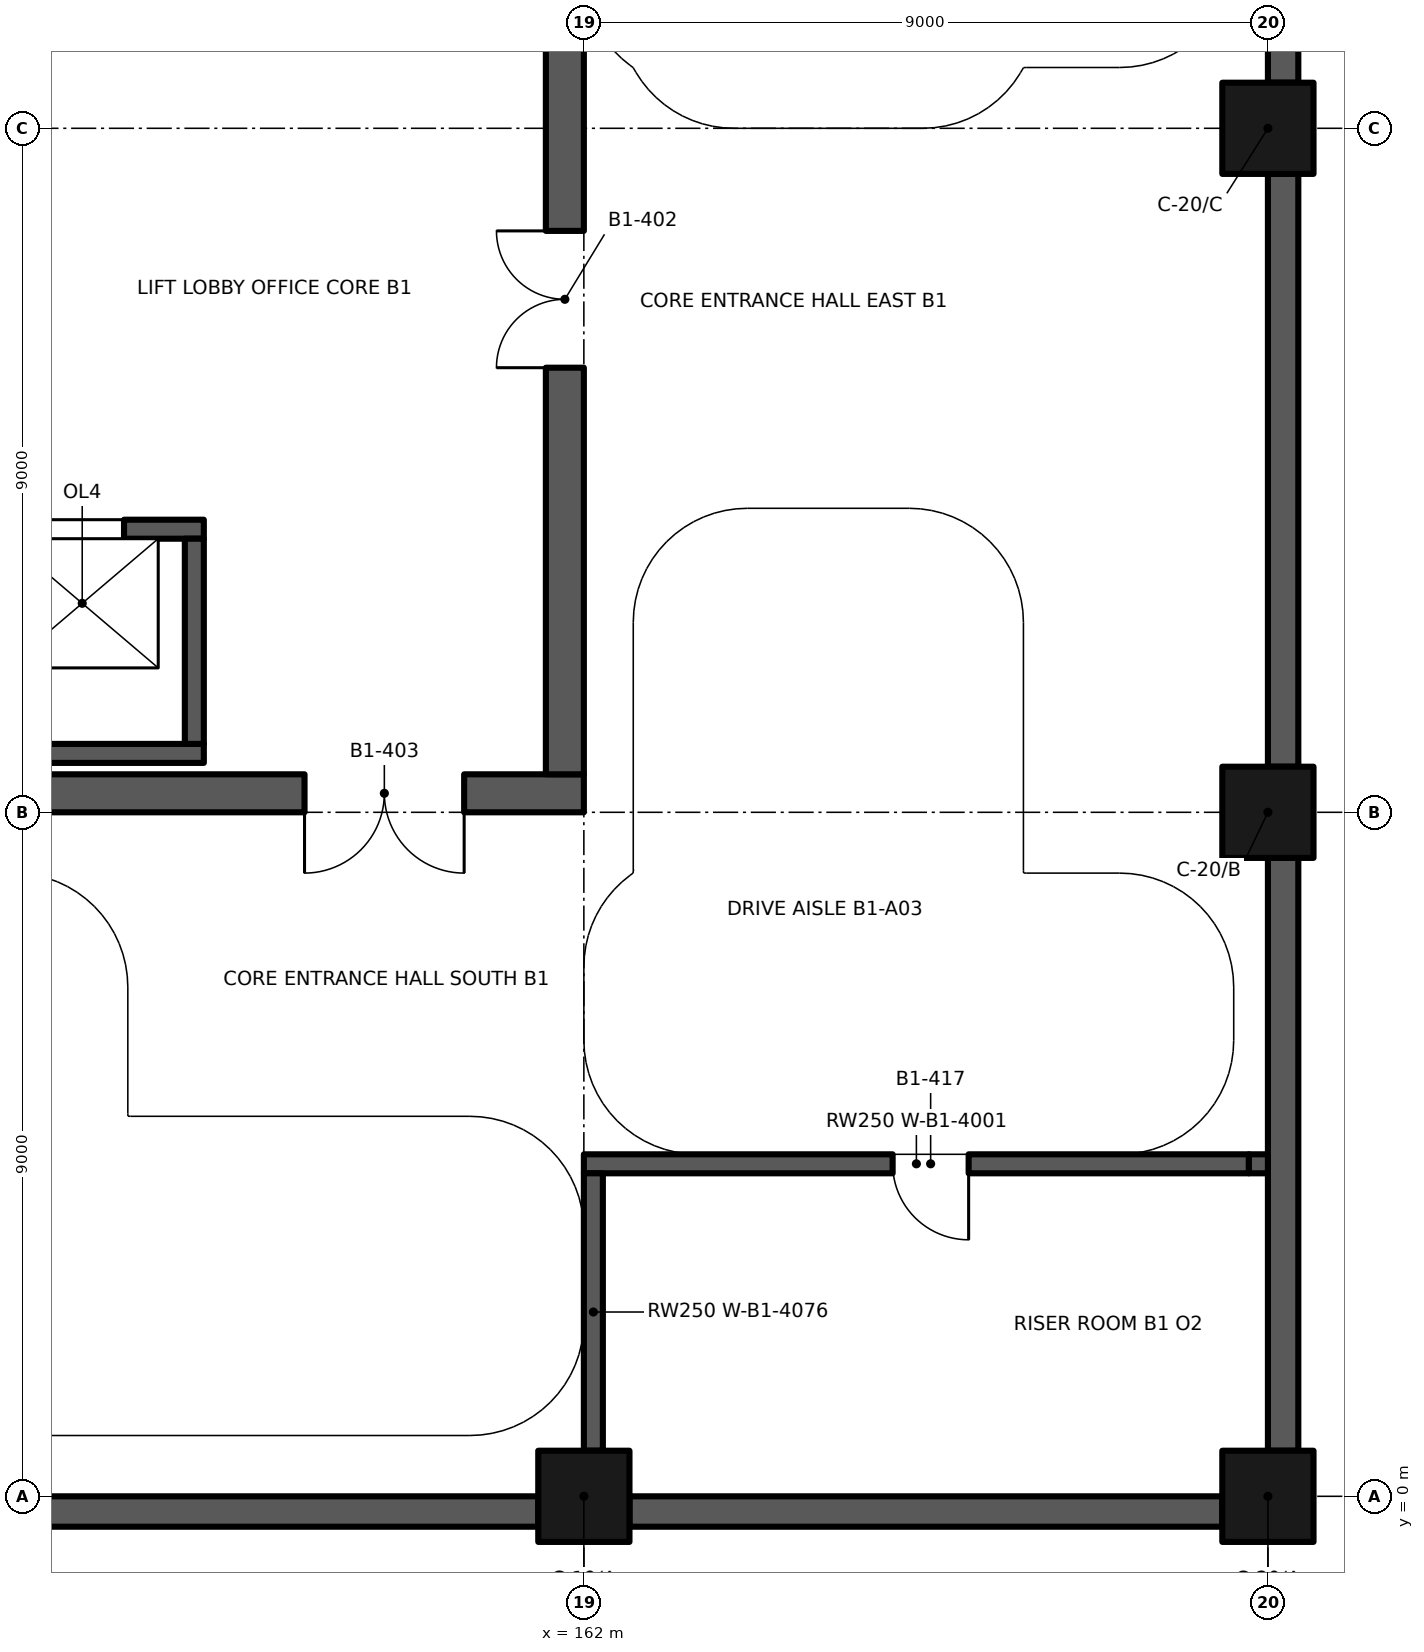
"""IFC4 building model, lengths in metres.
Left out: names, types, materials, properties, quantities, classifications, styles, units other than length and angle.
Written with IfcOpenShell. Run it as: python <this file> out.ifc"""

import sys

from ifc_helpers import new_model, si_unit, direction, frame, frame_2d, origin, origin_2d, place, context, subcontext, project, spatial, rectangle, extrude, element, fill, save


model = new_model("IFC4")
c1 = context("Model", 3, precision=1e-05, world=origin(), true_north=direction((0.0, 1.0)))
c2 = subcontext(c1, "Body", "Model", "MODEL_VIEW")
j1 = project(units=[si_unit("LENGTHUNIT", "METRE"), si_unit("PLANEANGLEUNIT", "RADIAN")], contexts=[c1])
p1 = place(None, origin())
s1 = spatial("IfcSite", under=j1, at=p1, CompositionType="ELEMENT")
p2 = place(p1, origin())
s2 = spatial("IfcBuilding", under=s1, at=p2, CompositionType="ELEMENT")
p3 = place(p2, frame((0.0, 0.0, -5.1)))
s3 = spatial("IfcBuildingStorey", under=s2, at=p3, CompositionType="ELEMENT", Elevation=-5.1)
for number, where, z_axis, x_axis in (
    (1, (153.6, -0.2, 0.0), (0.0, 0.0, 1.0), (1.0, 0.0, 0.0)),
    (2, (162.6, -0.2, 0.0), (0.0, 0.0, 1.0), (1.0, 0.0, 0.0)),
    (3, (171.2, 0.6, 0.0), (0.0, 0.0, 1.0), (0.0, 1.0, 0.0)),
    (4, (171.2, 9.6, 0.0), (0.0, 0.0, 1.0), (0.0, 1.0, 0.0)),
    (5, (171.2, 18.6, 0.0), (0.0, 0.0, 1.0), (0.0, 1.0, 0.0)),
):
    element("IfcWall", number, at=place(p3, frame(where, z_axis=z_axis, x_axis=x_axis)), inside=s3, PredefinedType="SOLIDWALL", context=c2, shape_type="SweptSolid", body=[
        extrude(rectangle(XDim=7.8, YDim=0.4, at=frame_2d((3.9, 0.0))), origin(), (0.0, 0.0, 1.0), 5.1),
    ])
for number, where, z_axis, x_axis in (
    (6, (162.0, 0.0, 0.0), (0.0, 0.0, 1.0), (1.0, 0.0, 0.0)),
    (7, (171.0, 0.0, 0.0), (0.0, 0.0, 1.0), (1.0, 0.0, 0.0)),
    (8, (171.0, 9.0, 0.0), (0.0, 0.0, 1.0), (1.0, 0.0, 0.0)),
    (9, (171.0, 18.0, 0.0), (0.0, 0.0, 1.0), (1.0, 0.0, 0.0)),
):
    element("IfcColumn", number, at=place(p3, frame(where, z_axis=z_axis, x_axis=x_axis)), inside=s3, PredefinedType="COLUMN", context=c2, shape_type="SweptSolid", body=[
        extrude(rectangle(XDim=1.2, YDim=1.2, at=origin_2d()), origin(), (0.0, 0.0, 1.0), 5.1),
    ])
p4 = place(p3, frame((144.5, 12.725, 0.0), z_axis=(0.0, 0.0, 1.0), x_axis=(1.0, 0.0, 0.0)))
e10 = element("IfcWall", 10, at=p4, inside=s3, PredefinedType="SHEAR", context=c2, shape_type="SweptSolid", body=[
    extrude(rectangle(XDim=12.5, YDim=0.25, at=frame_2d((6.25, 0.0))), origin(), (0.0, 0.0, 1.0), 5.1),
])
p5 = place(p4, frame((1.5, 0.0, 0.0)))
e11 = element("IfcOpeningElement", 11, at=p5, cuts=e10, PredefinedType="OPENING", context=c2, shape_type="SweptSolid", body=[
    extrude(rectangle(XDim=1.1, YDim=2.1, at=frame_2d((0.55, 1.05))), frame((0.0, 0.135, 0.0), z_axis=(0.0, -1.0, 0.0), x_axis=(1.0, 0.0, 0.0)), (0.0, 0.0, 1.0), 0.27),
])
p6 = place(p4, frame((4.45, 0.0, 0.0)))
e12 = element("IfcOpeningElement", 12, at=p6, cuts=e10, PredefinedType="OPENING", context=c2, shape_type="SweptSolid", body=[
    extrude(rectangle(XDim=1.1, YDim=2.1, at=frame_2d((0.55, 1.05))), frame((0.0, 0.135, 0.0), z_axis=(0.0, -1.0, 0.0), x_axis=(1.0, 0.0, 0.0)), (0.0, 0.0, 1.0), 0.27),
])
p7 = place(p4, frame((7.4, 0.0, 0.0)))
e13 = element("IfcOpeningElement", 13, at=p7, cuts=e10, PredefinedType="OPENING", context=c2, shape_type="SweptSolid", body=[
    extrude(rectangle(XDim=1.1, YDim=2.1, at=frame_2d((0.55, 1.05))), frame((0.0, 0.135, 0.0), z_axis=(0.0, -1.0, 0.0), x_axis=(1.0, 0.0, 0.0)), (0.0, 0.0, 1.0), 0.27),
])
p8 = place(p4, frame((10.35, 0.0, 0.0)))
e14 = element("IfcOpeningElement", 14, at=p8, cuts=e10, PredefinedType="OPENING", context=c2, shape_type="SweptSolid", body=[
    extrude(rectangle(XDim=1.1, YDim=2.1, at=frame_2d((0.55, 1.05))), frame((0.0, 0.135, 0.0), z_axis=(0.0, -1.0, 0.0), x_axis=(1.0, 0.0, 0.0)), (0.0, 0.0, 1.0), 0.27),
])
p9 = place(p3, frame((144.5, 9.775, 0.0), z_axis=(0.0, 0.0, 1.0), x_axis=(1.0, 0.0, 0.0)))
e15 = element("IfcWall", 15, at=p9, inside=s3, PredefinedType="SHEAR", context=c2, shape_type="SweptSolid", body=[
    extrude(rectangle(XDim=12.5, YDim=0.25, at=frame_2d((6.25, 0.0))), origin(), (0.0, 0.0, 1.0), 5.1),
])
p10 = place(p3, frame((156.875, 9.9, 0.0), z_axis=(0.0, 0.0, 1.0), x_axis=(0.0, 1.0, 0.0)))
e16 = element("IfcWall", 16, at=p10, inside=s3, PredefinedType="SHEAR", context=c2, shape_type="SweptSolid", body=[
    extrude(rectangle(XDim=2.7, YDim=0.25, at=frame_2d((1.35, 0.0))), origin(), (0.0, 0.0, 1.0), 5.1),
])
p11 = place(p3, frame((162.0, 4.375, 0.0), z_axis=(0.0, 0.0, 1.0), x_axis=(1.0, 0.0, 0.0)))
e17 = element("IfcWall", 17, at=p11, inside=s3, PredefinedType="SOLIDWALL", context=c2, shape_type="SweptSolid", body=[
    extrude(rectangle(XDim=8.75, YDim=0.25, at=frame_2d((4.375, 0.0))), origin(), (0.0, 0.0, 1.0), 4.75),
])
p12 = place(p11, frame((5.062, 0.0, 0.0), z_axis=(0.0, 0.0, 1.0), x_axis=(-1.0, 0.0, 0.0)))
e18 = element("IfcOpeningElement", 18, at=p12, cuts=e17, PredefinedType="OPENING", context=c2, shape_type="SweptSolid", body=[
    extrude(rectangle(XDim=1.0, YDim=2.1, at=frame_2d((0.5, 1.05))), frame((0.0, 0.135, 0.0), z_axis=(0.0, -1.0, 0.0), x_axis=(1.0, 0.0, 0.0)), (0.0, 0.0, 1.0), 0.27),
])
p13 = place(p3, frame((170.75, 4.375, 0.0), z_axis=(0.0, 0.0, 1.0), x_axis=(1.0, 0.0, 0.0)))
e19 = element("IfcWall", 19, at=p13, inside=s3, PredefinedType="SOLIDWALL", context=c2, shape_type="SweptSolid", body=[
    extrude(rectangle(XDim=0.25, YDim=0.25, at=frame_2d((0.125, 0.0))), origin(), (0.0, 0.0, 1.0), 4.2),
])
p14 = place(p3, frame((144.0, 9.25, 0.0), z_axis=(0.0, 0.0, 1.0), x_axis=(1.0, 0.0, 0.0)))
e20 = element("IfcWall", 20, at=p14, inside=s3, PredefinedType="SHEAR", context=c2, shape_type="SweptSolid", body=[
    extrude(rectangle(XDim=18.0, YDim=0.5, at=frame_2d((9.0, 0.0))), origin(), (0.0, 0.0, 1.0), 4.75),
])
p15 = place(p14, frame((16.425, 0.0, 0.0), z_axis=(0.0, 0.0, 1.0), x_axis=(-1.0, 0.0, 0.0)))
e21 = element("IfcOpeningElement", 21, at=p15, cuts=e20, PredefinedType="OPENING", context=c2, shape_type="SweptSolid", body=[
    extrude(rectangle(XDim=2.1, YDim=2.4, at=frame_2d((1.05, 1.2))), frame((0.0, 0.26, 0.0), z_axis=(0.0, -1.0, 0.0), x_axis=(1.0, 0.0, 0.0)), (0.0, 0.0, 1.0), 0.52),
])
p16 = place(p3, frame((161.75, 9.5, 0.0), z_axis=(0.0, 0.0, 1.0), x_axis=(0.0, 1.0, 0.0)))
e22 = element("IfcWall", 22, at=p16, inside=s3, PredefinedType="SHEAR", context=c2, shape_type="SweptSolid", body=[
    extrude(rectangle(XDim=17.0, YDim=0.5, at=frame_2d((8.5, 0.0))), origin(), (0.0, 0.0, 1.0), 4.75),
])
p17 = place(p16, frame((5.35, 0.0, 0.0)))
e23 = element("IfcOpeningElement", 23, at=p17, cuts=e22, PredefinedType="OPENING", context=c2, shape_type="SweptSolid", body=[
    extrude(rectangle(XDim=1.8, YDim=2.4, at=frame_2d((0.9, 1.2))), frame((0.0, 0.26, 0.0), z_axis=(0.0, -1.0, 0.0), x_axis=(1.0, 0.0, 0.0)), (0.0, 0.0, 1.0), 0.52),
])
p18 = place(p3, frame((162.125, 0.6, 0.0), z_axis=(0.0, 0.0, 1.0), x_axis=(0.0, 1.0, 0.0)))
e24 = element("IfcWall", 24, at=p18, inside=s3, PredefinedType="SOLIDWALL", context=c2, shape_type="SweptSolid", body=[
    extrude(rectangle(XDim=3.65, YDim=0.25, at=frame_2d((1.825, 0.0))), origin(), (0.0, 0.0, 1.0), 4.75),
])
p19 = place(p8, origin())
e25 = element("IfcDoor", 25, at=p19, inside=s3, OperationType="DOUBLE_DOOR_SLIDING", PredefinedType="DOOR", context=c2, shape_type="SweptSolid", body=[
    extrude(rectangle(XDim=1.1, YDim=2.1, at=frame_2d((0.55, 1.05))), frame((0.0, 0.025, 0.0), z_axis=(0.0, -1.0, 0.0), x_axis=(1.0, 0.0, 0.0)), (0.0, 0.0, 1.0), 0.05),
])
fill(e14, e25)
p20 = place(p17, origin())
e26 = element("IfcDoor", 26, at=p20, inside=s3, OperationType="DOUBLE_DOOR_SINGLE_SWING", PredefinedType="DOOR", context=c2, shape_type="SweptSolid", body=[
    extrude(rectangle(XDim=1.8, YDim=2.4, at=frame_2d((0.9, 1.2))), frame((0.0, 0.025, 0.0), z_axis=(0.0, -1.0, 0.0), x_axis=(1.0, 0.0, 0.0)), (0.0, 0.0, 1.0), 0.05),
])
fill(e23, e26)
p21 = place(p15, origin())
e27 = element("IfcDoor", 27, at=p21, inside=s3, OperationType="DOUBLE_DOOR_SINGLE_SWING", PredefinedType="DOOR", context=c2, shape_type="SweptSolid", body=[
    extrude(rectangle(XDim=2.1, YDim=2.4, at=frame_2d((1.05, 1.2))), frame((0.0, 0.025, 0.0), z_axis=(0.0, -1.0, 0.0), x_axis=(1.0, 0.0, 0.0)), (0.0, 0.0, 1.0), 0.05),
])
fill(e21, e27)
p22 = place(p12, origin())
e28 = element("IfcDoor", 28, at=p22, inside=s3, OperationType="SINGLE_SWING_LEFT", PredefinedType="DOOR", context=c2, shape_type="SweptSolid", body=[
    extrude(rectangle(XDim=1.0, YDim=2.1, at=frame_2d((0.5, 1.05))), frame((0.0, 0.025, 0.0), z_axis=(0.0, -1.0, 0.0), x_axis=(1.0, 0.0, 0.0)), (0.0, 0.0, 1.0), 0.05),
])
fill(e18, e28)
save(model, sys.argv[1])
